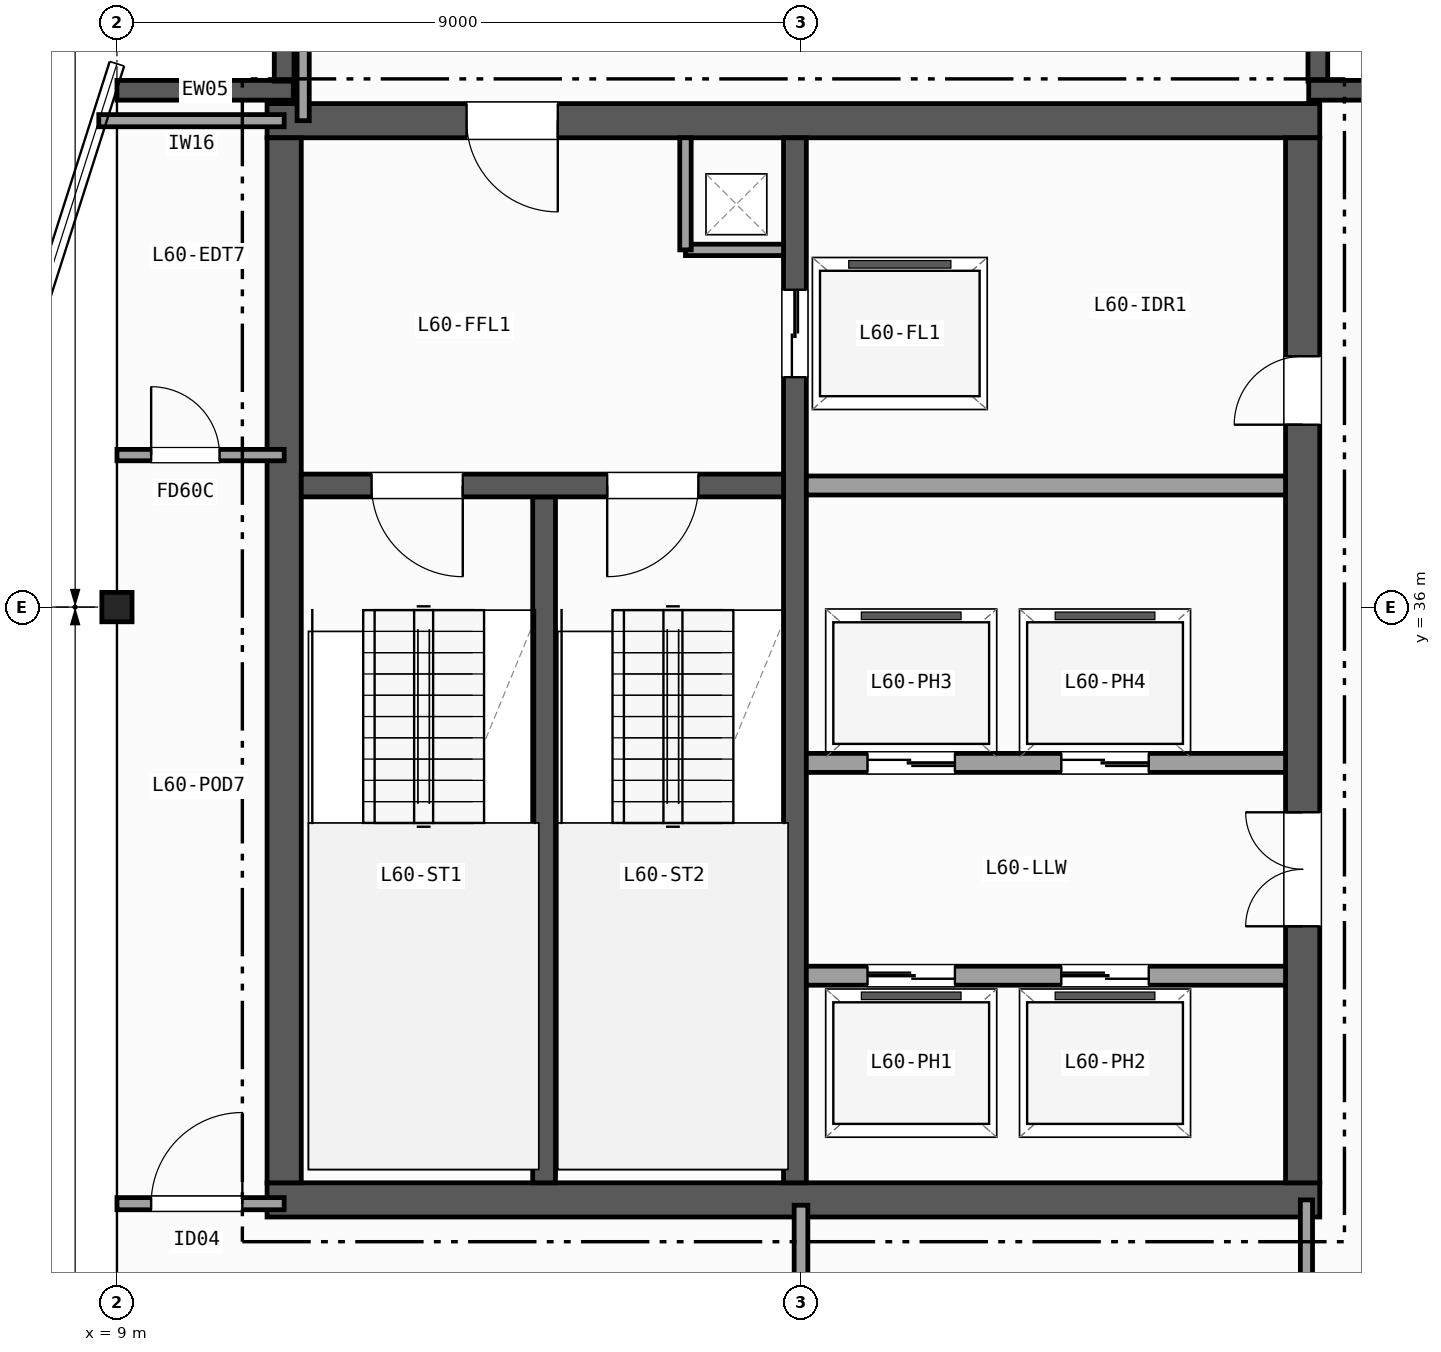
"""IFC4 building model, lengths in metres.
Left out: names, types, materials, properties, quantities, classifications, styles, units other than length and angle.
Written with IfcOpenShell. Run it as: python <this file> out.ifc"""

import sys

from ifc_helpers import new_model, si_unit, direction, frame, frame_2d, origin, origin_2d, place, context, subcontext, project, spatial, rectangle, i_section, extrude, element, fill, save


model = new_model("IFC4")
c1 = context("Model", 3, precision=1e-05, world=origin(), true_north=direction((0.0, 1.0)))
c2 = subcontext(c1, "Body", "Model", "MODEL_VIEW")
j1 = project(units=[si_unit("LENGTHUNIT", "METRE"), si_unit("PLANEANGLEUNIT", "RADIAN")], contexts=[c1])
p1 = place(None, origin())
s1 = spatial("IfcSite", under=j1, at=p1, CompositionType="ELEMENT")
p2 = place(p1, origin())
s2 = spatial("IfcBuilding", under=s1, at=p2, CompositionType="ELEMENT")
p3 = place(p2, frame((0.0, 0.0, 240.8)))
s3 = spatial("IfcBuildingStorey", under=s2, at=p3, CompositionType="ELEMENT", Elevation=240.8)
p4 = place(p3, frame((9.0, 36.0, 0.0), z_axis=(0.0, 0.0, 1.0), x_axis=(1.0, 0.0, 0.0)))
e1 = element("IfcColumn", 1, at=p4, inside=s3, PredefinedType="COLUMN", context=c2, shape_type="SweptSolid", body=[
    extrude(i_section(OverallWidth=0.397, OverallDepth=0.387, WebThickness=0.021, FlangeThickness=0.033, FilletRadius=0.015, at=origin_2d()), origin(), (0.0, 0.0, 1.0), 3.7),
])
p5 = place(p3, frame((9.0, 42.8, 0.0), z_axis=(0.0, 0.0, 1.0), x_axis=(1.0, 0.0, 0.0)))
e2 = element("IfcWall", 2, at=p5, inside=s3, PredefinedType="SOLIDWALL", context=c2, shape_type="SweptSolid", body=[
    extrude(rectangle(XDim=2.32, YDim=0.26, at=frame_2d((1.16, 0.0))), origin(), (0.0, 0.0, 1.0), 3.42),
])
for number, where, z_axis, x_axis in (
    (3, (11.2, 42.92, 0.0), (0.0, 0.0, 1.0), (0.0, 1.0, 0.0)),
    (4, (24.8, 45.0, 0.0), (0.0, 0.0, 1.0), (0.0, -1.0, 0.0)),
):
    element("IfcWall", number, at=place(p3, frame(where, z_axis=z_axis, x_axis=x_axis)), inside=s3, PredefinedType="SOLIDWALL", context=c2, shape_type="SweptSolid", body=[
        extrude(rectangle(XDim=2.08, YDim=0.26, at=frame_2d((1.04, 0.0))), origin(), (0.0, 0.0, 1.0), 3.42),
    ])
p6 = place(p3, frame((24.68, 42.8, 0.0), z_axis=(0.0, 0.0, 1.0), x_axis=(1.0, 0.0, 0.0)))
e5 = element("IfcWall", 5, at=p6, inside=s3, PredefinedType="SOLIDWALL", context=c2, shape_type="SweptSolid", body=[
    extrude(rectangle(XDim=2.32, YDim=0.26, at=frame_2d((1.16, 0.0))), origin(), (0.0, 0.0, 1.0), 3.42),
])
p7 = place(p3, frame((10.975, 28.2, 0.0), z_axis=(0.0, 0.0, 1.0), x_axis=(1.0, 0.0, 0.0)))
e6 = element("IfcWall", 6, at=p7, inside=s3, PredefinedType="SHEAR", context=c2, shape_type="SweptSolid", body=[
    extrude(rectangle(XDim=13.85, YDim=0.45, at=frame_2d((6.925, 0.0))), origin(), (0.0, 0.0, 1.0), 3.42),
])
p8 = place(p3, frame((24.825, 42.4, 0.0), z_axis=(0.0, 0.0, 1.0), x_axis=(-1.0, 0.0, 0.0)))
e7 = element("IfcWall", 7, at=p8, inside=s3, PredefinedType="SHEAR", context=c2, shape_type="SweptSolid", body=[
    extrude(rectangle(XDim=13.85, YDim=0.45, at=frame_2d((6.925, 0.0))), origin(), (0.0, 0.0, 1.0), 3.42),
])
p9 = place(p8, frame((10.025, 0.0, 0.0)))
e8 = element("IfcOpeningElement", 8, at=p9, cuts=e7, PredefinedType="OPENING", context=c2, shape_type="SweptSolid", body=[
    extrude(rectangle(XDim=1.2, YDim=2.15, at=frame_2d((0.6, 1.075))), frame((0.0, 0.235, 0.0), z_axis=(0.0, -1.0, 0.0), x_axis=(1.0, 0.0, 0.0)), (0.0, 0.0, 1.0), 0.47),
])
p10 = place(p3, frame((11.2, 42.175, 0.0), z_axis=(0.0, 0.0, 1.0), x_axis=(0.0, -1.0, 0.0)))
e9 = element("IfcWall", 9, at=p10, inside=s3, PredefinedType="SHEAR", context=c2, shape_type="SweptSolid", body=[
    extrude(rectangle(XDim=13.75, YDim=0.45, at=frame_2d((6.875, 0.0))), origin(), (0.0, 0.0, 1.0), 3.42),
])
p11 = place(p3, frame((24.6, 28.425, 0.0), z_axis=(0.0, 0.0, 1.0), x_axis=(0.0, 1.0, 0.0)))
e10 = element("IfcWall", 10, at=p11, inside=s3, PredefinedType="SHEAR", context=c2, shape_type="SweptSolid", body=[
    extrude(rectangle(XDim=13.75, YDim=0.45, at=frame_2d((6.875, 0.0))), origin(), (0.0, 0.0, 1.0), 3.42),
])
p12 = place(p11, frame((3.375, 0.0, 0.0)))
e11 = element("IfcOpeningElement", 11, at=p12, cuts=e10, PredefinedType="OPENING", context=c2, shape_type="SweptSolid", body=[
    extrude(rectangle(XDim=1.5, YDim=2.2, at=frame_2d((0.75, 1.1))), frame((0.0, 0.235, 0.0), z_axis=(0.0, -1.0, 0.0), x_axis=(1.0, 0.0, 0.0)), (0.0, 0.0, 1.0), 0.47),
])
p13 = place(p11, frame((9.975, 0.0, 0.0)))
e12 = element("IfcOpeningElement", 12, at=p13, cuts=e10, PredefinedType="OPENING", context=c2, shape_type="SweptSolid", body=[
    extrude(rectangle(XDim=0.9, YDim=2.1, at=frame_2d((0.45, 1.05))), frame((0.0, 0.235, 0.0), z_axis=(0.0, -1.0, 0.0), x_axis=(1.0, 0.0, 0.0)), (0.0, 0.0, 1.0), 0.47),
])
p14 = place(p3, frame((14.62, 28.425, 0.0), z_axis=(0.0, 0.0, 1.0), x_axis=(0.0, 1.0, 0.0)))
e13 = element("IfcWall", 13, at=p14, inside=s3, PredefinedType="SHEAR", context=c2, shape_type="SweptSolid", body=[
    extrude(rectangle(XDim=9.025, YDim=0.3, at=frame_2d((4.512, 0.0))), origin(), (0.0, 0.0, 1.0), 3.42),
])
p15 = place(p3, frame((17.92, 42.175, 0.0), z_axis=(0.0, 0.0, 1.0), x_axis=(0.0, -1.0, 0.0)))
e14 = element("IfcWall", 14, at=p15, inside=s3, PredefinedType="SHEAR", context=c2, shape_type="SweptSolid", body=[
    extrude(rectangle(XDim=13.75, YDim=0.3, at=frame_2d((6.875, 0.0))), origin(), (0.0, 0.0, 1.0), 3.42),
])
p16 = place(p15, frame((2.0, 0.0, 0.0)))
e15 = element("IfcOpeningElement", 15, at=p16, cuts=e14, PredefinedType="OPENING", context=c2, shape_type="SweptSolid", body=[
    extrude(rectangle(XDim=1.15, YDim=2.15, at=frame_2d((0.575, 1.075))), frame((0.0, 0.16, 0.0), z_axis=(0.0, -1.0, 0.0), x_axis=(1.0, 0.0, 0.0)), (0.0, 0.0, 1.0), 0.32),
])
p17 = place(p3, frame((17.77, 37.6, 0.0), z_axis=(0.0, 0.0, 1.0), x_axis=(-1.0, 0.0, 0.0)))
e16 = element("IfcWall", 16, at=p17, inside=s3, PredefinedType="SHEAR", context=c2, shape_type="SweptSolid", body=[
    extrude(rectangle(XDim=6.345, YDim=0.3, at=frame_2d((3.172, 0.0))), origin(), (0.0, 0.0, 1.0), 3.42),
])
p18 = place(p17, frame((4.22, 0.0, 0.0)))
e17 = element("IfcOpeningElement", 17, at=p18, cuts=e16, PredefinedType="OPENING", context=c2, shape_type="SweptSolid", body=[
    extrude(rectangle(XDim=1.2, YDim=2.15, at=frame_2d((0.6, 1.075))), frame((0.0, 0.16, 0.0), z_axis=(0.0, -1.0, 0.0), x_axis=(1.0, 0.0, 0.0)), (0.0, 0.0, 1.0), 0.32),
])
p19 = place(p17, frame((1.12, 0.0, 0.0)))
e18 = element("IfcOpeningElement", 18, at=p19, cuts=e16, PredefinedType="OPENING", context=c2, shape_type="SweptSolid", body=[
    extrude(rectangle(XDim=1.2, YDim=2.15, at=frame_2d((0.6, 1.075))), frame((0.0, 0.16, 0.0), z_axis=(0.0, -1.0, 0.0), x_axis=(1.0, 0.0, 0.0)), (0.0, 0.0, 1.0), 0.32),
])
p20 = place(p3, frame((16.48, 40.7, 0.0), z_axis=(0.0, 0.0, 1.0), x_axis=(1.0, 0.0, 0.0)))
e19 = element("IfcWall", 19, at=p20, inside=s3, PredefinedType="PARTITIONING", context=c2, shape_type="SweptSolid", body=[
    extrude(rectangle(XDim=1.29, YDim=0.15, at=frame_2d((0.645, 0.0))), origin(), (0.0, 0.0, 1.0), 3.42),
])
p21 = place(p3, frame((16.48, 40.7, 0.0), z_axis=(0.0, 0.0, 1.0), x_axis=(0.0, 1.0, 0.0)))
e20 = element("IfcWall", 20, at=p21, inside=s3, PredefinedType="PARTITIONING", context=c2, shape_type="SweptSolid", body=[
    extrude(rectangle(XDim=1.475, YDim=0.15, at=frame_2d((0.738, 0.0))), origin(), (0.0, 0.0, 1.0), 3.42),
])
p22 = place(p3, frame((18.07, 37.6, 0.0), z_axis=(0.0, 0.0, 1.0), x_axis=(1.0, 0.0, 0.0)))
e21 = element("IfcWall", 21, at=p22, inside=s3, PredefinedType="PARTITIONING", context=c2, shape_type="SweptSolid", body=[
    extrude(rectangle(XDim=6.305, YDim=0.25, at=frame_2d((3.152, 0.0))), origin(), (0.0, 0.0, 1.0), 3.42),
])
p23 = place(p3, frame((18.07, 31.15, 0.0), z_axis=(0.0, 0.0, 1.0), x_axis=(1.0, 0.0, 0.0)))
e22 = element("IfcWall", 22, at=p23, inside=s3, PredefinedType="PARTITIONING", context=c2, shape_type="SweptSolid", body=[
    extrude(rectangle(XDim=6.305, YDim=0.25, at=frame_2d((3.152, 0.0))), origin(), (0.0, 0.0, 1.0), 3.42),
])
p24 = place(p23, frame((0.805, 0.0, 0.0)))
e23 = element("IfcOpeningElement", 23, at=p24, cuts=e22, PredefinedType="OPENING", context=c2, shape_type="SweptSolid", body=[
    extrude(rectangle(XDim=1.15, YDim=2.15, at=frame_2d((0.575, 1.075))), frame((0.0, 0.135, 0.0), z_axis=(0.0, -1.0, 0.0), x_axis=(1.0, 0.0, 0.0)), (0.0, 0.0, 1.0), 0.27),
])
p25 = place(p23, frame((3.355, 0.0, 0.0)))
e24 = element("IfcOpeningElement", 24, at=p25, cuts=e22, PredefinedType="OPENING", context=c2, shape_type="SweptSolid", body=[
    extrude(rectangle(XDim=1.15, YDim=2.15, at=frame_2d((0.575, 1.075))), frame((0.0, 0.135, 0.0), z_axis=(0.0, -1.0, 0.0), x_axis=(1.0, 0.0, 0.0)), (0.0, 0.0, 1.0), 0.27),
])
p26 = place(p3, frame((24.375, 33.95, 0.0), z_axis=(0.0, 0.0, 1.0), x_axis=(-1.0, 0.0, 0.0)))
e25 = element("IfcWall", 25, at=p26, inside=s3, PredefinedType="PARTITIONING", context=c2, shape_type="SweptSolid", body=[
    extrude(rectangle(XDim=6.305, YDim=0.25, at=frame_2d((3.152, 0.0))), origin(), (0.0, 0.0, 1.0), 3.42),
])
p27 = place(p26, frame((4.35, 0.0, 0.0)))
e26 = element("IfcOpeningElement", 26, at=p27, cuts=e25, PredefinedType="OPENING", context=c2, shape_type="SweptSolid", body=[
    extrude(rectangle(XDim=1.15, YDim=2.15, at=frame_2d((0.575, 1.075))), frame((0.0, 0.135, 0.0), z_axis=(0.0, -1.0, 0.0), x_axis=(1.0, 0.0, 0.0)), (0.0, 0.0, 1.0), 0.27),
])
p28 = place(p26, frame((1.8, 0.0, 0.0)))
e27 = element("IfcOpeningElement", 27, at=p28, cuts=e25, PredefinedType="OPENING", context=c2, shape_type="SweptSolid", body=[
    extrude(rectangle(XDim=1.15, YDim=2.15, at=frame_2d((0.575, 1.075))), frame((0.0, 0.135, 0.0), z_axis=(0.0, -1.0, 0.0), x_axis=(1.0, 0.0, 0.0)), (0.0, 0.0, 1.0), 0.27),
])
p29 = place(p3, frame((9.0, 28.15, 0.0), z_axis=(0.0, 0.0, 1.0), x_axis=(1.0, 0.0, 0.0)))
e28 = element("IfcWall", 28, at=p29, inside=s3, PredefinedType="PARTITIONING", context=c2, shape_type="SweptSolid", body=[
    extrude(rectangle(XDim=2.2, YDim=0.16, at=frame_2d((1.1, 0.0))), origin(), (0.0, 0.0, 1.0), 2.707),
])
p30 = place(p29, frame((0.45, 0.0, 0.0)))
e29 = element("IfcOpeningElement", 29, at=p30, cuts=e28, PredefinedType="OPENING", context=c2, shape_type="SweptSolid", body=[
    extrude(rectangle(XDim=1.2, YDim=2.15, at=frame_2d((0.6, 1.075))), frame((0.0, 0.09, 0.0), z_axis=(0.0, -1.0, 0.0), x_axis=(1.0, 0.0, 0.0)), (0.0, 0.0, 1.0), 0.18),
])
p31 = place(p3, frame((8.761, 42.4, 0.0), z_axis=(0.0, 0.0, 1.0), x_axis=(1.0, 0.0, 0.0)))
e30 = element("IfcWall", 30, at=p31, inside=s3, PredefinedType="PARTITIONING", context=c2, shape_type="SweptSolid", body=[
    extrude(rectangle(XDim=2.439, YDim=0.16, at=frame_2d((1.219, 0.0))), origin(), (0.0, 0.0, 1.0), 3.42),
])
p32 = place(p3, frame((11.45, 42.4, 0.0), z_axis=(0.0, 0.0, 1.0), x_axis=(0.0, 1.0, 0.0)))
e31 = element("IfcWall", 31, at=p32, inside=s3, PredefinedType="PARTITIONING", context=c2, shape_type="SweptSolid", body=[
    extrude(rectangle(XDim=2.666, YDim=0.16, at=frame_2d((1.333, 0.0))), origin(), (0.0, 0.0, 1.0), 3.42),
])
p33 = place(p3, frame((9.0, 38.0, 0.0), z_axis=(0.0, 0.0, 1.0), x_axis=(1.0, 0.0, 0.0)))
e32 = element("IfcWall", 32, at=p33, inside=s3, PredefinedType="PARTITIONING", context=c2, shape_type="SweptSolid", body=[
    extrude(rectangle(XDim=2.2, YDim=0.15, at=frame_2d((1.1, 0.0))), origin(), (0.0, 0.0, 1.0), 3.42),
])
p34 = place(p33, frame((0.45, 0.0, 0.0)))
e33 = element("IfcOpeningElement", 33, at=p34, cuts=e32, PredefinedType="OPENING", context=c2, shape_type="SweptSolid", body=[
    extrude(rectangle(XDim=0.9, YDim=2.1, at=frame_2d((0.45, 1.05))), frame((0.0, 0.085, 0.0), z_axis=(0.0, -1.0, 0.0), x_axis=(1.0, 0.0, 0.0)), (0.0, 0.0, 1.0), 0.17),
])
p35 = place(p3, frame((24.65, 9.0, 0.0), z_axis=(0.0, 0.0, 1.0), x_axis=(0.0, 1.0, 0.0)))
e34 = element("IfcWall", 34, at=p35, inside=s3, PredefinedType="PARTITIONING", context=c2, shape_type="SweptSolid", body=[
    extrude(rectangle(XDim=19.2, YDim=0.16, at=frame_2d((9.6, 0.0))), origin(), (0.0, 0.0, 1.0), 2.707),
])
p36 = place(p35, frame((3.2, 0.0, 0.0)))
e35 = element("IfcOpeningElement", 35, at=p36, cuts=e34, PredefinedType="OPENING", context=c2, shape_type="SweptSolid", body=[
    extrude(rectangle(XDim=0.95, YDim=2.1, at=frame_2d((0.475, 1.05))), frame((0.0, 0.09, 0.0), z_axis=(0.0, -1.0, 0.0), x_axis=(1.0, 0.0, 0.0)), (0.0, 0.0, 1.0), 0.18),
])
p37 = place(p35, frame((12.765, 0.0, 0.0)))
e36 = element("IfcOpeningElement", 36, at=p37, cuts=e34, PredefinedType="OPENING", context=c2, shape_type="SweptSolid", body=[
    extrude(rectangle(XDim=1.0, YDim=2.1, at=frame_2d((0.5, 1.05))), frame((0.0, 0.09, 0.0), z_axis=(0.0, -1.0, 0.0), x_axis=(1.0, 0.0, 0.0)), (0.0, 0.0, 1.0), 0.18),
])
p38 = place(p3, frame((18.0, 9.0, 0.0), z_axis=(0.0, 0.0, 1.0), x_axis=(0.0, 1.0, 0.0)))
e37 = element("IfcWall", 37, at=p38, inside=s3, PredefinedType="PARTITIONING", context=c2, shape_type="SweptSolid", body=[
    extrude(rectangle(XDim=19.13, YDim=0.18, at=frame_2d((9.565, 0.0))), origin(), (0.0, 0.0, 1.0), 2.707),
])
p39 = place(p38, frame((2.2, 0.0, 0.0)))
e38 = element("IfcOpeningElement", 38, at=p39, cuts=e37, PredefinedType="OPENING", context=c2, shape_type="SweptSolid", body=[
    extrude(rectangle(XDim=1.05, YDim=2.15, at=frame_2d((0.525, 1.075))), frame((0.0, 0.1, 0.0), z_axis=(0.0, -1.0, 0.0), x_axis=(1.0, 0.0, 0.0)), (0.0, 0.0, 1.0), 0.2),
])
p40 = place(p38, frame((13.5, 0.0, 0.0)))
e39 = element("IfcOpeningElement", 39, at=p40, cuts=e37, PredefinedType="OPENING", context=c2, shape_type="SweptSolid", body=[
    extrude(rectangle(XDim=1.2, YDim=2.15, at=frame_2d((0.6, 1.075))), frame((0.0, 0.1, 0.0), z_axis=(0.0, -1.0, 0.0), x_axis=(1.0, 0.0, 0.0)), (0.0, 0.0, 1.0), 0.2),
])
p41 = place(p18, origin())
e40 = element("IfcDoor", 40, at=p41, inside=s3, OperationType="SINGLE_SWING_LEFT", PredefinedType="DOOR", context=c2, shape_type="SweptSolid", body=[
    extrude(rectangle(XDim=1.2, YDim=2.15, at=frame_2d((0.6, 1.075))), frame((0.0, 0.025, 0.0), z_axis=(0.0, -1.0, 0.0), x_axis=(1.0, 0.0, 0.0)), (0.0, 0.0, 1.0), 0.05),
])
fill(e17, e40)
p42 = place(p19, origin())
e41 = element("IfcDoor", 41, at=p42, inside=s3, OperationType="SINGLE_SWING_RIGHT", PredefinedType="DOOR", context=c2, shape_type="SweptSolid", body=[
    extrude(rectangle(XDim=1.2, YDim=2.15, at=frame_2d((0.6, 1.075))), frame((0.0, 0.025, 0.0), z_axis=(0.0, -1.0, 0.0), x_axis=(1.0, 0.0, 0.0)), (0.0, 0.0, 1.0), 0.05),
])
fill(e18, e41)
p43 = place(p12, origin())
e42 = element("IfcDoor", 42, at=p43, inside=s3, OperationType="DOUBLE_DOOR_SINGLE_SWING", PredefinedType="DOOR", context=c2, shape_type="SweptSolid", body=[
    extrude(rectangle(XDim=1.5, YDim=2.2, at=frame_2d((0.75, 1.1))), frame((0.0, 0.025, 0.0), z_axis=(0.0, -1.0, 0.0), x_axis=(1.0, 0.0, 0.0)), (0.0, 0.0, 1.0), 0.05),
])
fill(e11, e42)
p44 = place(p9, origin())
e43 = element("IfcDoor", 43, at=p44, inside=s3, OperationType="SINGLE_SWING_LEFT", PredefinedType="DOOR", context=c2, shape_type="SweptSolid", body=[
    extrude(rectangle(XDim=1.2, YDim=2.15, at=frame_2d((0.6, 1.075))), frame((0.0, 0.025, 0.0), z_axis=(0.0, -1.0, 0.0), x_axis=(1.0, 0.0, 0.0)), (0.0, 0.0, 1.0), 0.05),
])
fill(e8, e43)
p45 = place(p13, origin())
e44 = element("IfcDoor", 44, at=p45, inside=s3, OperationType="SINGLE_SWING_LEFT", PredefinedType="DOOR", context=c2, shape_type="SweptSolid", body=[
    extrude(rectangle(XDim=0.9, YDim=2.1, at=frame_2d((0.45, 1.05))), frame((0.0, 0.025, 0.0), z_axis=(0.0, -1.0, 0.0), x_axis=(1.0, 0.0, 0.0)), (0.0, 0.0, 1.0), 0.05),
])
fill(e12, e44)
p46 = place(p16, origin())
e45 = element("IfcDoor", 45, at=p46, inside=s3, OperationType="DOUBLE_DOOR_SLIDING", PredefinedType="DOOR", context=c2, shape_type="SweptSolid", body=[
    extrude(rectangle(XDim=1.15, YDim=2.15, at=frame_2d((0.575, 1.075))), frame((0.0, 0.025, 0.0), z_axis=(0.0, -1.0, 0.0), x_axis=(1.0, 0.0, 0.0)), (0.0, 0.0, 1.0), 0.05),
])
fill(e15, e45)
p47 = place(p24, origin())
e46 = element("IfcDoor", 46, at=p47, inside=s3, OperationType="DOUBLE_DOOR_SLIDING", PredefinedType="DOOR", context=c2, shape_type="SweptSolid", body=[
    extrude(rectangle(XDim=1.15, YDim=2.15, at=frame_2d((0.575, 1.075))), frame((0.0, 0.025, 0.0), z_axis=(0.0, -1.0, 0.0), x_axis=(1.0, 0.0, 0.0)), (0.0, 0.0, 1.0), 0.05),
])
fill(e23, e46)
p48 = place(p25, origin())
e47 = element("IfcDoor", 47, at=p48, inside=s3, OperationType="DOUBLE_DOOR_SLIDING", PredefinedType="DOOR", context=c2, shape_type="SweptSolid", body=[
    extrude(rectangle(XDim=1.15, YDim=2.15, at=frame_2d((0.575, 1.075))), frame((0.0, 0.025, 0.0), z_axis=(0.0, -1.0, 0.0), x_axis=(1.0, 0.0, 0.0)), (0.0, 0.0, 1.0), 0.05),
])
fill(e24, e47)
p49 = place(p27, origin())
e48 = element("IfcDoor", 48, at=p49, inside=s3, OperationType="DOUBLE_DOOR_SLIDING", PredefinedType="DOOR", context=c2, shape_type="SweptSolid", body=[
    extrude(rectangle(XDim=1.15, YDim=2.15, at=frame_2d((0.575, 1.075))), frame((0.0, 0.025, 0.0), z_axis=(0.0, -1.0, 0.0), x_axis=(1.0, 0.0, 0.0)), (0.0, 0.0, 1.0), 0.05),
])
fill(e26, e48)
p50 = place(p28, origin())
e49 = element("IfcDoor", 49, at=p50, inside=s3, OperationType="DOUBLE_DOOR_SLIDING", PredefinedType="DOOR", context=c2, shape_type="SweptSolid", body=[
    extrude(rectangle(XDim=1.15, YDim=2.15, at=frame_2d((0.575, 1.075))), frame((0.0, 0.025, 0.0), z_axis=(0.0, -1.0, 0.0), x_axis=(1.0, 0.0, 0.0)), (0.0, 0.0, 1.0), 0.05),
])
fill(e27, e49)
p51 = place(p30, origin())
e50 = element("IfcDoor", 50, at=p51, inside=s3, OperationType="SINGLE_SWING_RIGHT", PredefinedType="DOOR", context=c2, shape_type="SweptSolid", body=[
    extrude(rectangle(XDim=1.2, YDim=2.15, at=frame_2d((0.6, 1.075))), frame((0.0, 0.025, 0.0), z_axis=(0.0, -1.0, 0.0), x_axis=(1.0, 0.0, 0.0)), (0.0, 0.0, 1.0), 0.05),
])
fill(e29, e50)
p52 = place(p34, origin())
e51 = element("IfcDoor", 51, at=p52, inside=s3, OperationType="SINGLE_SWING_LEFT", PredefinedType="DOOR", context=c2, shape_type="SweptSolid", body=[
    extrude(rectangle(XDim=0.9, YDim=2.1, at=frame_2d((0.45, 1.05))), frame((0.0, 0.025, 0.0), z_axis=(0.0, -1.0, 0.0), x_axis=(1.0, 0.0, 0.0)), (0.0, 0.0, 1.0), 0.05),
])
fill(e33, e51)
save(model, sys.argv[1])
